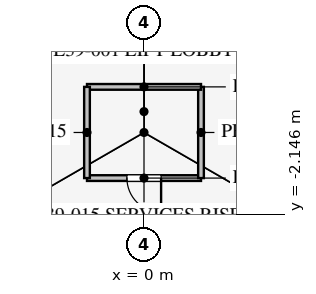
"""IFC4 building model, lengths in metres.
Left out: names, types, materials, properties, quantities, classifications, styles, units other than length and angle.
Written with IfcOpenShell. Run it as: python <this file> out.ifc"""

import sys

from ifc_helpers import new_model, si_unit, direction, frame, frame_2d, origin, place, context, subcontext, project, spatial, rectangle, extrude, element, fill, save


model = new_model("IFC4")
c1 = context("Model", 3, precision=1e-05, world=origin(), true_north=direction((0.0, 1.0)))
c2 = subcontext(c1, "Body", "Model", "MODEL_VIEW")
j1 = project(units=[si_unit("LENGTHUNIT", "METRE"), si_unit("PLANEANGLEUNIT", "RADIAN")], contexts=[c1])
p1 = place(None, origin())
s1 = spatial("IfcSite", under=j1, at=p1, CompositionType="ELEMENT")
p2 = place(p1, origin())
s2 = spatial("IfcBuilding", under=s1, at=p2, CompositionType="ELEMENT")
p3 = place(p2, frame((0.0, 0.0, 170.3)))
s3 = spatial("IfcBuildingStorey", under=s2, at=p3, CompositionType="ELEMENT", Elevation=170.3)
p4 = place(p3, frame((-1.5, -1.2, 0.0), z_axis=(0.0, 0.0, 1.0), x_axis=(1.0, 0.0, 0.0)))
e1 = element("IfcWall", 1, at=p4, inside=s3, PredefinedType="PARTITIONING", context=c2, shape_type="SweptSolid", body=[
    extrude(rectangle(XDim=3.0, YDim=0.15, at=frame_2d((1.5, 0.0))), origin(), (0.0, 0.0, 1.0), 4.0),
])
p5 = place(p4, frame((1.05, 0.0, 0.0)))
e2 = element("IfcOpeningElement", 2, at=p5, cuts=e1, PredefinedType="OPENING", context=c2, shape_type="SweptSolid", body=[
    extrude(rectangle(XDim=0.9, YDim=2.1, at=frame_2d((0.45, 1.05))), frame((0.0, 0.085, 0.0), z_axis=(0.0, -1.0, 0.0), x_axis=(1.0, 0.0, 0.0)), (0.0, 0.0, 1.0), 0.17),
])
p6 = place(p3, frame((1.5, -1.2, 0.0), z_axis=(0.0, 0.0, 1.0), x_axis=(0.0, 1.0, 0.0)))
e3 = element("IfcWall", 3, at=p6, inside=s3, PredefinedType="PARTITIONING", context=c2, shape_type="SweptSolid", body=[
    extrude(rectangle(XDim=2.4, YDim=0.15, at=frame_2d((1.2, 0.0))), origin(), (0.0, 0.0, 1.0), 4.0),
])
p7 = place(p3, frame((1.5, 1.2, 0.0), z_axis=(0.0, 0.0, 1.0), x_axis=(-1.0, 0.0, 0.0)))
e4 = element("IfcWall", 4, at=p7, inside=s3, PredefinedType="PARTITIONING", context=c2, shape_type="SweptSolid", body=[
    extrude(rectangle(XDim=3.0, YDim=0.15, at=frame_2d((1.5, 0.0))), origin(), (0.0, 0.0, 1.0), 4.0),
])
p8 = place(p3, frame((-1.5, 1.2, 0.0), z_axis=(0.0, 0.0, 1.0), x_axis=(0.0, -1.0, 0.0)))
e5 = element("IfcWall", 5, at=p8, inside=s3, PredefinedType="PARTITIONING", context=c2, shape_type="SweptSolid", body=[
    extrude(rectangle(XDim=2.4, YDim=0.15, at=frame_2d((1.2, 0.0))), origin(), (0.0, 0.0, 1.0), 4.0),
])
p9 = place(p3, frame((-0.016, 30.491, 0.0), z_axis=(0.0, 0.0, 1.0), x_axis=(-0.50000091641, -0.866024874695, 0.0)))
e6 = element("IfcWall", 6, at=p9, inside=s3, PredefinedType="PARTITIONING", context=c2, shape_type="SweptSolid", body=[
    extrude(rectangle(XDim=52.796, YDim=0.12, at=frame_2d((26.398, 0.0))), origin(), (0.0, 0.0, 1.0), 2.9),
])
p10 = place(p9, frame((10.2, 0.0, 0.15)))
e7 = element("IfcOpeningElement", 7, at=p10, cuts=e6, PredefinedType="OPENING", context=c2, shape_type="SweptSolid", body=[
    extrude(rectangle(XDim=1.8, YDim=2.1, at=frame_2d((0.9, 1.05))), frame((0.0, 0.07, 0.0), z_axis=(0.0, -1.0, 0.0), x_axis=(1.0, 0.0, 0.0)), (0.0, 0.0, 1.0), 0.14),
])
p11 = place(p9, frame((40.8, 0.0, 0.15)))
e8 = element("IfcOpeningElement", 8, at=p11, cuts=e6, PredefinedType="OPENING", context=c2, shape_type="SweptSolid", body=[
    extrude(rectangle(XDim=1.8, YDim=2.1, at=frame_2d((0.9, 1.05))), frame((0.0, 0.07, 0.0), z_axis=(0.0, -1.0, 0.0), x_axis=(1.0, 0.0, 0.0)), (0.0, 0.0, 1.0), 0.14),
])
p12 = place(p5, frame((0.9, 0.0, 0.0), z_axis=(0.0, 0.0, 1.0), x_axis=(-1.0, 0.0, 0.0)))
e9 = element("IfcDoor", 9, at=p12, inside=s3, OperationType="SINGLE_SWING_LEFT", PredefinedType="DOOR", context=c2, shape_type="SweptSolid", body=[
    extrude(rectangle(XDim=0.9, YDim=2.1, at=frame_2d((0.45, 1.05))), frame((0.0, 0.025, 0.0), z_axis=(0.0, -1.0, 0.0), x_axis=(1.0, 0.0, 0.0)), (0.0, 0.0, 1.0), 0.05),
])
fill(e2, e9)
save(model, sys.argv[1])
